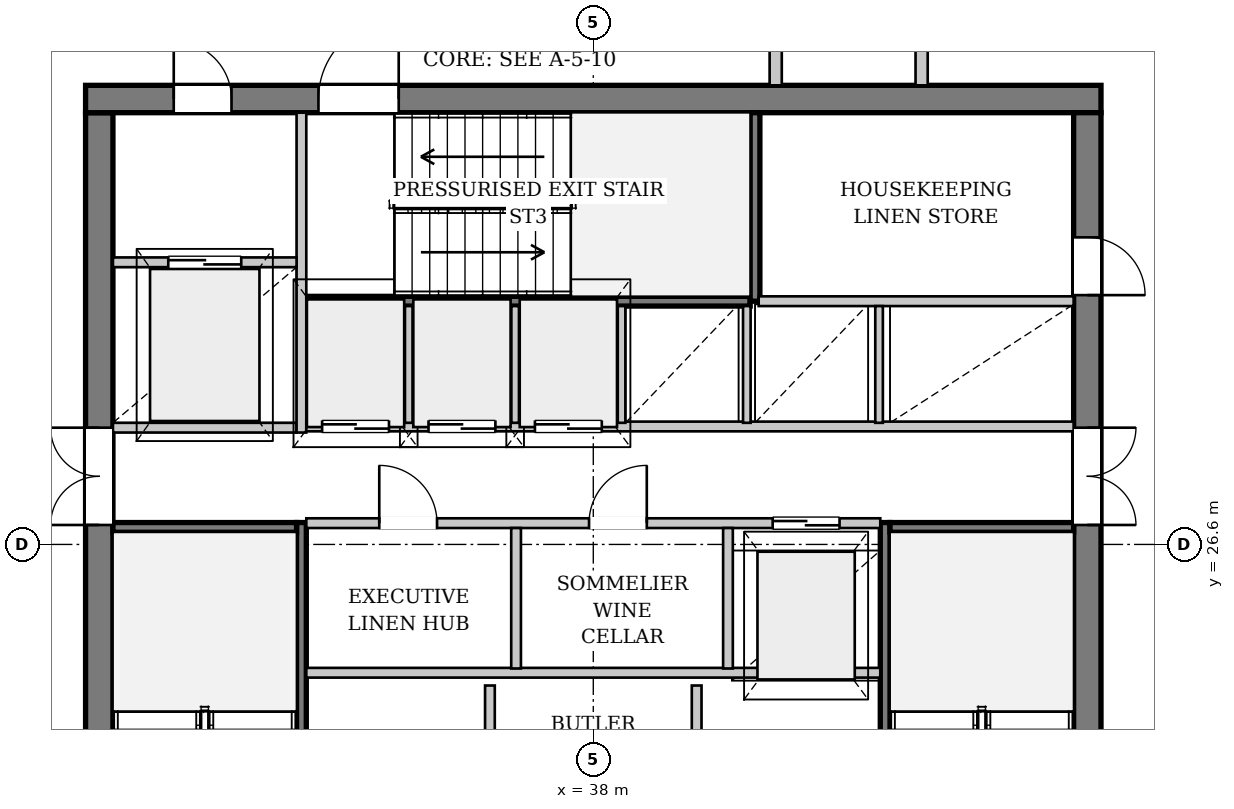
"""IFC4 building model, lengths in metres.
Left out: names, types, materials, properties, quantities, classifications, styles, units other than length and angle.
Written with IfcOpenShell. Run it as: python <this file> out.ifc"""

import sys

from ifc_helpers import new_model, si_unit, direction, frame, frame_2d, origin, place, context, subcontext, project, spatial, rectangle, extrude, source, transform, mapped, element, fill, save


model = new_model("IFC4")
c1 = context("Model", 3, precision=1e-05, world=origin(), true_north=direction((0.0, 1.0)))
c2 = subcontext(c1, "Body", "Model", "MODEL_VIEW")
j1 = project(units=[si_unit("LENGTHUNIT", "METRE"), si_unit("PLANEANGLEUNIT", "RADIAN")], contexts=[c1])
p1 = place(None, origin())
s1 = spatial("IfcSite", under=j1, at=p1, CompositionType="ELEMENT")
p2 = place(p1, origin())
s2 = spatial("IfcBuilding", under=s1, at=p2, CompositionType="ELEMENT")
p3 = place(p2, frame((0.0, 0.0, 256.1)))
s3 = spatial("IfcBuildingStorey", under=s2, at=p3, CompositionType="ELEMENT", Elevation=256.1)
p4 = place(p3, frame((51.86, 26.393, 0.0), z_axis=(0.0, 0.0, 1.0), x_axis=(-0.287077598684, -0.957907329721, 0.0)))
e1 = element("IfcWall", 1, at=p4, inside=s3, PredefinedType="SOLIDWALL", context=c2, shape_type="SweptSolid", body=[
    extrude(rectangle(XDim=22.458, YDim=0.32, at=frame_2d((11.229, 0.0))), origin(), (0.0, 0.0, 1.0), 2.872),
])
p5 = place(p4, frame((6.437, 0.0, 0.0)))
e2 = element("IfcOpeningElement", 2, at=p5, cuts=e1, PredefinedType="OPENING", context=c2, shape_type="SweptSolid", body=[
    extrude(rectangle(XDim=1.5, YDim=2.3, at=frame_2d((0.75, 1.15))), frame((0.0, 0.17, 0.0), z_axis=(0.0, -1.0, 0.0), x_axis=(1.0, 0.0, 0.0)), (0.0, 0.0, 1.0), 0.34),
])
p6 = place(p4, frame((15.319, 0.0, 0.402)))
e3 = element("IfcOpeningElement", 3, at=p6, cuts=e1, PredefinedType="OPENING", context=c2, shape_type="SweptSolid", body=[
    extrude(rectangle(XDim=2.6, YDim=2.35, at=frame_2d((1.3, 1.175))), frame((0.0, 0.17, 0.0), z_axis=(0.0, -1.0, 0.0), x_axis=(1.0, 0.0, 0.0)), (0.0, 0.0, 1.0), 0.34),
])
p7 = place(p3, frame((15.751, 27.495, 0.0), z_axis=(0.0, 0.0, 1.0), x_axis=(0.818194527571, 0.574941488373, 0.0)))
e4 = element("IfcWall", 4, at=p7, inside=s3, PredefinedType="SOLIDWALL", context=c2, shape_type="SweptSolid", body=[
    extrude(rectangle(XDim=21.931, YDim=0.38, at=frame_2d((10.965, 0.0))), origin(), (0.0, 0.0, 1.0), 2.872),
])
p8 = place(p7, frame((5.041, 0.0, 0.502)))
e5 = element("IfcOpeningElement", 5, at=p8, cuts=e4, PredefinedType="OPENING", context=c2, shape_type="SweptSolid", body=[
    extrude(rectangle(XDim=2.2, YDim=2.25, at=frame_2d((1.1, 1.125))), frame((0.0, 0.2, 0.0), z_axis=(0.0, -1.0, 0.0), x_axis=(1.0, 0.0, 0.0)), (0.0, 0.0, 1.0), 0.4),
])
p9 = place(p7, frame((15.79, 0.0, 0.502)))
e6 = element("IfcOpeningElement", 6, at=p9, cuts=e4, PredefinedType="OPENING", context=c2, shape_type="SweptSolid", body=[
    extrude(rectangle(XDim=2.2, YDim=2.25, at=frame_2d((1.1, 1.125))), frame((0.0, 0.2, 0.0), z_axis=(0.0, -1.0, 0.0), x_axis=(1.0, 0.0, 0.0)), (0.0, 0.0, 1.0), 0.4),
])
p10 = place(p3, frame((46.5, 5.302, 0.0), z_axis=(0.0, 0.0, 1.0), x_axis=(0.282616163499, 0.959233081232, 0.0)))
e7 = element("IfcWall", 7, at=p10, inside=s3, PredefinedType="PARAPET", context=c2, shape_type="SweptSolid", body=[
    extrude(rectangle(XDim=20.038, YDim=0.22, at=frame_2d((10.019, 0.0))), origin(), (0.0, 0.0, 1.0), 0.3),
])
p11 = place(p3, frame((29.875, 19.5, 0.0), z_axis=(0.0, 0.0, 1.0), x_axis=(0.0, 1.0, 0.0)))
e8 = element("IfcWall", 8, at=p11, inside=s3, PredefinedType="SHEAR", context=c2, shape_type="SweptSolid", body=[
    extrude(rectangle(XDim=14.2, YDim=0.45, at=frame_2d((7.1, 0.0))), origin(), (0.0, 0.0, 1.0), 3.38),
])
p12 = place(p11, frame((7.42, 0.0, 0.0)))
e9 = element("IfcOpeningElement", 9, at=p12, cuts=e8, PredefinedType="OPENING", context=c2, shape_type="SweptSolid", body=[
    extrude(rectangle(XDim=1.6, YDim=2.2, at=frame_2d((0.8, 1.1))), frame((0.0, 0.235, 0.0), z_axis=(0.0, -1.0, 0.0), x_axis=(1.0, 0.0, 0.0)), (0.0, 0.0, 1.0), 0.47),
])
p13 = place(p3, frame((29.65, 33.925, 0.0), z_axis=(0.0, 0.0, 1.0), x_axis=(1.0, 0.0, 0.0)))
e10 = element("IfcWall", 10, at=p13, inside=s3, PredefinedType="SHEAR", context=c2, shape_type="SweptSolid", body=[
    extrude(rectangle(XDim=16.7, YDim=0.45, at=frame_2d((8.35, 0.0))), origin(), (0.0, 0.0, 1.0), 3.38),
])
p14 = place(p13, frame((1.45, 0.0, 0.0)))
e11 = element("IfcOpeningElement", 11, at=p14, cuts=e10, PredefinedType="OPENING", context=c2, shape_type="SweptSolid", body=[
    extrude(rectangle(XDim=0.95, YDim=2.1, at=frame_2d((0.475, 1.05))), frame((0.0, 0.235, 0.0), z_axis=(0.0, -1.0, 0.0), x_axis=(1.0, 0.0, 0.0)), (0.0, 0.0, 1.0), 0.47),
])
p15 = place(p13, frame((3.83, 0.0, 0.0)))
e12 = element("IfcOpeningElement", 12, at=p15, cuts=e10, PredefinedType="OPENING", context=c2, shape_type="SweptSolid", body=[
    extrude(rectangle(XDim=1.32, YDim=2.2, at=frame_2d((0.66, 1.1))), frame((0.0, 0.235, 0.0), z_axis=(0.0, -1.0, 0.0), x_axis=(1.0, 0.0, 0.0)), (0.0, 0.0, 1.0), 0.47),
])
p16 = place(p3, frame((46.125, 33.7, 0.0), z_axis=(0.0, 0.0, 1.0), x_axis=(0.0, -1.0, 0.0)))
e13 = element("IfcWall", 13, at=p16, inside=s3, PredefinedType="SHEAR", context=c2, shape_type="SweptSolid", body=[
    extrude(rectangle(XDim=14.2, YDim=0.45, at=frame_2d((7.1, 0.0))), origin(), (0.0, 0.0, 1.0), 3.38),
])
p17 = place(p16, frame((5.18, 0.0, 0.0)))
e14 = element("IfcOpeningElement", 14, at=p17, cuts=e13, PredefinedType="OPENING", context=c2, shape_type="SweptSolid", body=[
    extrude(rectangle(XDim=1.6, YDim=2.2, at=frame_2d((0.8, 1.1))), frame((0.0, 0.235, 0.0), z_axis=(0.0, -1.0, 0.0), x_axis=(1.0, 0.0, 0.0)), (0.0, 0.0, 1.0), 0.47),
])
p18 = place(p16, frame((2.05, 0.0, 0.0)))
e15 = element("IfcOpeningElement", 15, at=p18, cuts=e13, PredefinedType="OPENING", context=c2, shape_type="SweptSolid", body=[
    extrude(rectangle(XDim=0.95, YDim=2.1, at=frame_2d((0.475, 1.05))), frame((0.0, 0.235, 0.0), z_axis=(0.0, -1.0, 0.0), x_axis=(1.0, 0.0, 0.0)), (0.0, 0.0, 1.0), 0.47),
])
p19 = place(p3, frame((33.2, 19.5, 0.0), z_axis=(0.0, 0.0, 1.0), x_axis=(0.0, 1.0, 0.0)))
e16 = element("IfcWall", 16, at=p19, inside=s3, PredefinedType="PARTITIONING", context=c2, shape_type="SweptSolid", body=[
    extrude(rectangle(XDim=7.46, YDim=0.16, at=frame_2d((3.73, 0.0))), origin(), (0.0, 0.0, 1.0), 3.38),
])
p20 = place(p19, frame((0.08, 0.0, 0.0)))
e17 = element("IfcOpeningElement", 17, at=p20, cuts=e16, PredefinedType="OPENING", context=c2, shape_type="SweptSolid", body=[
    extrude(rectangle(XDim=1.32, YDim=2.2, at=frame_2d((0.66, 1.1))), frame((0.0, 0.09, 0.0), z_axis=(0.0, -1.0, 0.0), x_axis=(1.0, 0.0, 0.0)), (0.0, 0.0, 1.0), 0.18),
])
p21 = place(p3, frame((30.1, 26.88, 0.0), z_axis=(0.0, 0.0, 1.0), x_axis=(1.0, 0.0, 0.0)))
e18 = element("IfcWall", 18, at=p21, inside=s3, PredefinedType="PARTITIONING", context=c2, shape_type="SweptSolid", body=[
    extrude(rectangle(XDim=3.02, YDim=0.16, at=frame_2d((1.51, 0.0))), origin(), (0.0, 0.0, 1.0), 3.38),
])
p22 = place(p3, frame((42.8, 26.96, 0.0), z_axis=(0.0, 0.0, 1.0), x_axis=(0.0, -1.0, 0.0)))
e19 = element("IfcWall", 19, at=p22, inside=s3, PredefinedType="PARTITIONING", context=c2, shape_type="SweptSolid", body=[
    extrude(rectangle(XDim=7.46, YDim=0.16, at=frame_2d((3.73, 0.0))), origin(), (0.0, 0.0, 1.0), 3.38),
])
p23 = place(p22, frame((6.06, 0.0, 0.0)))
e20 = element("IfcOpeningElement", 20, at=p23, cuts=e19, PredefinedType="OPENING", context=c2, shape_type="SweptSolid", body=[
    extrude(rectangle(XDim=1.32, YDim=2.2, at=frame_2d((0.66, 1.1))), frame((0.0, 0.09, 0.0), z_axis=(0.0, -1.0, 0.0), x_axis=(1.0, 0.0, 0.0)), (0.0, 0.0, 1.0), 0.18),
])
p24 = place(p3, frame((42.88, 26.88, 0.0), z_axis=(0.0, 0.0, 1.0), x_axis=(1.0, 0.0, 0.0)))
e21 = element("IfcWall", 21, at=p24, inside=s3, PredefinedType="PARTITIONING", context=c2, shape_type="SweptSolid", body=[
    extrude(rectangle(XDim=3.02, YDim=0.16, at=frame_2d((1.51, 0.0))), origin(), (0.0, 0.0, 1.0), 3.38),
])
p25 = place(p3, frame((33.28, 30.6, 0.0), z_axis=(0.0, 0.0, 1.0), x_axis=(1.0, 0.0, 0.0)))
e22 = element("IfcWall", 22, at=p25, inside=s3, PredefinedType="PARTITIONING", context=c2, shape_type="SweptSolid", body=[
    extrude(rectangle(XDim=7.3, YDim=0.16, at=frame_2d((3.65, 0.0))), origin(), (0.0, 0.0, 1.0), 3.38),
])
p26 = place(p3, frame((40.66, 30.6, 0.0), z_axis=(0.0, 0.0, 1.0), x_axis=(0.0, 1.0, 0.0)))
e23 = element("IfcWall", 23, at=p26, inside=s3, PredefinedType="PARTITIONING", context=c2, shape_type="SweptSolid", body=[
    extrude(rectangle(XDim=3.1, YDim=0.16, at=frame_2d((1.55, 0.0))), origin(), (0.0, 0.0, 1.0), 3.38),
])
p27 = place(p3, frame((36.3, 19.5, 0.0), z_axis=(0.0, 0.0, 1.0), x_axis=(0.0, 1.0, 0.0)))
e24 = element("IfcWall", 24, at=p27, inside=s3, PredefinedType="PARTITIONING", context=c2, shape_type="SweptSolid", body=[
    extrude(rectangle(XDim=4.78, YDim=0.16, at=frame_2d((2.39, 0.0))), origin(), (0.0, 0.0, 1.0), 3.38),
])
p28 = place(p27, frame((0.6, 0.0, 0.0)))
e25 = element("IfcOpeningElement", 25, at=p28, cuts=e24, PredefinedType="OPENING", context=c2, shape_type="SweptSolid", body=[
    extrude(rectangle(XDim=1.2, YDim=2.2, at=frame_2d((0.6, 1.1))), frame((0.0, 0.09, 0.0), z_axis=(0.0, -1.0, 0.0), x_axis=(1.0, 0.0, 0.0)), (0.0, 0.0, 1.0), 0.18),
])
p29 = place(p27, frame((2.65, 0.0, 0.0)))
e26 = element("IfcOpeningElement", 26, at=p29, cuts=e24, PredefinedType="OPENING", context=c2, shape_type="SweptSolid", body=[
    extrude(rectangle(XDim=0.95, YDim=2.1, at=frame_2d((0.475, 1.05))), frame((0.0, 0.09, 0.0), z_axis=(0.0, -1.0, 0.0), x_axis=(1.0, 0.0, 0.0)), (0.0, 0.0, 1.0), 0.18),
])
p30 = place(p3, frame((39.7, 24.28, 0.0), z_axis=(0.0, 0.0, 1.0), x_axis=(0.0, -1.0, 0.0)))
e27 = element("IfcWall", 27, at=p30, inside=s3, PredefinedType="PARTITIONING", context=c2, shape_type="SweptSolid", body=[
    extrude(rectangle(XDim=4.78, YDim=0.16, at=frame_2d((2.39, 0.0))), origin(), (0.0, 0.0, 1.0), 3.38),
])
p31 = place(p30, frame((3.12, 0.0, 0.0)))
e28 = element("IfcOpeningElement", 28, at=p31, cuts=e27, PredefinedType="OPENING", context=c2, shape_type="SweptSolid", body=[
    extrude(rectangle(XDim=1.2, YDim=2.2, at=frame_2d((0.6, 1.1))), frame((0.0, 0.09, 0.0), z_axis=(0.0, -1.0, 0.0), x_axis=(1.0, 0.0, 0.0)), (0.0, 0.0, 1.0), 0.18),
])
p32 = place(p3, frame((33.28, 24.49, 0.0), z_axis=(0.0, 0.0, 1.0), x_axis=(1.0, 0.0, 0.0)))
e29 = element("IfcWall", 29, at=p32, inside=s3, PredefinedType="PARTITIONING", context=c2, shape_type="SweptSolid", body=[
    extrude(rectangle(XDim=9.44, YDim=0.16, at=frame_2d((4.72, 0.0))), origin(), (0.0, 0.0, 1.0), 3.38),
])
p33 = place(p3, frame((30.1, 28.52, 0.0), z_axis=(0.0, 0.0, 1.0), x_axis=(1.0, 0.0, 0.0)))
e30 = element("IfcWall", 30, at=p33, inside=s3, PredefinedType="PARTITIONING", context=c2, shape_type="SweptSolid", body=[
    extrude(rectangle(XDim=3.02, YDim=0.16, at=frame_2d((1.51, 0.0))), origin(), (0.0, 0.0, 1.0), 3.38),
])
p34 = place(p3, frame((33.2, 28.44, 0.0), z_axis=(0.0, 0.0, 1.0), x_axis=(0.0, 1.0, 0.0)))
e31 = element("IfcWall", 31, at=p34, inside=s3, PredefinedType="PARTITIONING", context=c2, shape_type="SweptSolid", body=[
    extrude(rectangle(XDim=5.26, YDim=0.16, at=frame_2d((2.63, 0.0))), origin(), (0.0, 0.0, 1.0), 3.38),
])
p35 = place(p3, frame((30.1, 31.24, 0.0), z_axis=(0.0, 0.0, 1.0), x_axis=(1.0, 0.0, 0.0)))
e32 = element("IfcWall", 32, at=p35, inside=s3, PredefinedType="PARTITIONING", context=c2, shape_type="SweptSolid", body=[
    extrude(rectangle(XDim=3.02, YDim=0.16, at=frame_2d((1.51, 0.0))), origin(), (0.0, 0.0, 1.0), 3.38),
])
p36 = place(p35, frame((0.91, 0.0, 0.0)))
e33 = element("IfcOpeningElement", 33, at=p36, cuts=e32, PredefinedType="OPENING", context=c2, shape_type="SweptSolid", body=[
    extrude(rectangle(XDim=1.2, YDim=2.2, at=frame_2d((0.6, 1.1))), frame((0.0, 0.09, 0.0), z_axis=(0.0, -1.0, 0.0), x_axis=(1.0, 0.0, 0.0)), (0.0, 0.0, 1.0), 0.18),
])
p37 = place(p3, frame((33.28, 26.95, 0.0), z_axis=(0.0, 0.0, 1.0), x_axis=(1.0, 0.0, 0.0)))
e34 = element("IfcWall", 34, at=p37, inside=s3, PredefinedType="PARTITIONING", context=c2, shape_type="SweptSolid", body=[
    extrude(rectangle(XDim=9.44, YDim=0.16, at=frame_2d((4.72, 0.0))), origin(), (0.0, 0.0, 1.0), 3.38),
])
p38 = place(p37, frame((1.2, 0.0, 0.0)))
e35 = element("IfcOpeningElement", 35, at=p38, cuts=e34, PredefinedType="OPENING", context=c2, shape_type="SweptSolid", body=[
    extrude(rectangle(XDim=0.95, YDim=2.1, at=frame_2d((0.475, 1.05))), frame((0.0, 0.09, 0.0), z_axis=(0.0, -1.0, 0.0), x_axis=(1.0, 0.0, 0.0)), (0.0, 0.0, 1.0), 0.18),
])
p39 = place(p37, frame((4.65, 0.0, 0.0)))
e36 = element("IfcOpeningElement", 36, at=p39, cuts=e34, PredefinedType="OPENING", context=c2, shape_type="SweptSolid", body=[
    extrude(rectangle(XDim=0.95, YDim=2.1, at=frame_2d((0.475, 1.05))), frame((0.0, 0.09, 0.0), z_axis=(0.0, -1.0, 0.0), x_axis=(1.0, 0.0, 0.0)), (0.0, 0.0, 1.0), 0.18),
])
p40 = place(p37, frame((7.67, 0.0, 0.0)))
e37 = element("IfcOpeningElement", 37, at=p40, cuts=e34, PredefinedType="OPENING", context=c2, shape_type="SweptSolid", body=[
    extrude(rectangle(XDim=1.1, YDim=2.2, at=frame_2d((0.55, 1.1))), frame((0.0, 0.09, 0.0), z_axis=(0.0, -1.0, 0.0), x_axis=(1.0, 0.0, 0.0)), (0.0, 0.0, 1.0), 0.18),
])
for number, where, z_axis, x_axis in (
    (38, (36.73, 24.56, 0.0), (0.0, 0.0, 1.0), (0.0, 1.0, 0.0)),
    (39, (40.215, 24.56, 0.0), (0.0, 0.0, 1.0), (0.0, 1.0, 0.0)),
):
    element("IfcWall", number, at=place(p3, frame(where, z_axis=z_axis, x_axis=x_axis)), inside=s3, PredefinedType="PARTITIONING", context=c2, shape_type="SweptSolid", body=[
        extrude(rectangle(XDim=2.31, YDim=0.16, at=frame_2d((1.155, 0.0))), origin(), (0.0, 0.0, 1.0), 3.38),
    ])
p41 = place(p3, frame((33.28, 28.54, 0.0), z_axis=(0.0, 0.0, 1.0), x_axis=(1.0, 0.0, 0.0)))
e40 = element("IfcWall", 40, at=p41, inside=s3, PredefinedType="PARTITIONING", context=c2, shape_type="SweptSolid", body=[
    extrude(rectangle(XDim=12.62, YDim=0.16, at=frame_2d((6.31, 0.0))), origin(), (0.0, 0.0, 1.0), 3.38),
])
p42 = place(p41, frame((0.26, 0.0, 0.0)))
e41 = element("IfcOpeningElement", 41, at=p42, cuts=e40, PredefinedType="OPENING", context=c2, shape_type="SweptSolid", body=[
    extrude(rectangle(XDim=1.1, YDim=2.2, at=frame_2d((0.55, 1.1))), frame((0.0, 0.09, 0.0), z_axis=(0.0, -1.0, 0.0), x_axis=(1.0, 0.0, 0.0)), (0.0, 0.0, 1.0), 0.18),
])
p43 = place(p41, frame((2.01, 0.0, 0.0)))
e42 = element("IfcOpeningElement", 42, at=p43, cuts=e40, PredefinedType="OPENING", context=c2, shape_type="SweptSolid", body=[
    extrude(rectangle(XDim=1.1, YDim=2.2, at=frame_2d((0.55, 1.1))), frame((0.0, 0.09, 0.0), z_axis=(0.0, -1.0, 0.0), x_axis=(1.0, 0.0, 0.0)), (0.0, 0.0, 1.0), 0.18),
])
p44 = place(p41, frame((3.76, 0.0, 0.0)))
e43 = element("IfcOpeningElement", 43, at=p44, cuts=e40, PredefinedType="OPENING", context=c2, shape_type="SweptSolid", body=[
    extrude(rectangle(XDim=1.1, YDim=2.2, at=frame_2d((0.55, 1.1))), frame((0.0, 0.09, 0.0), z_axis=(0.0, -1.0, 0.0), x_axis=(1.0, 0.0, 0.0)), (0.0, 0.0, 1.0), 0.18),
])
p45 = place(p3, frame((40.72, 30.6, 0.0), z_axis=(0.0, 0.0, 1.0), x_axis=(1.0, 0.0, 0.0)))
e44 = element("IfcWall", 44, at=p45, inside=s3, PredefinedType="PARTITIONING", context=c2, shape_type="SweptSolid", body=[
    extrude(rectangle(XDim=5.18, YDim=0.16, at=frame_2d((2.59, 0.0))), origin(), (0.0, 0.0, 1.0), 3.38),
])
for number, where, z_axis, x_axis in (
    (45, (34.965, 28.6, 0.0), (0.0, 0.0, 1.0), (0.0, 1.0, 0.0)),
    (46, (36.715, 28.6, 0.0), (0.0, 0.0, 1.0), (0.0, 1.0, 0.0)),
    (47, (38.465, 28.6, 0.0), (0.0, 0.0, 1.0), (0.0, 1.0, 0.0)),
    (48, (40.525, 28.6, 0.0), (0.0, 0.0, 1.0), (0.0, 1.0, 0.0)),
    (49, (42.7, 28.6, 0.0), (0.0, 0.0, 1.0), (0.0, 1.0, 0.0)),
):
    element("IfcWall", number, at=place(p3, frame(where, z_axis=z_axis, x_axis=x_axis)), inside=s3, PredefinedType="PARTITIONING", context=c2, shape_type="SweptSolid", body=[
        extrude(rectangle(XDim=1.92, YDim=0.125, at=frame_2d((0.96, 0.0))), origin(), (0.0, 0.0, 1.0), 3.38),
    ])
p46 = place(p3, frame((41.0, 34.15, 0.0), z_axis=(0.0, 0.0, 1.0), x_axis=(0.0, 1.0, 0.0)))
e50 = element("IfcWall", 50, at=p46, inside=s3, PredefinedType="PARTITIONING", context=c2, shape_type="SweptSolid", body=[
    extrude(rectangle(XDim=1.85, YDim=0.2, at=frame_2d((0.925, 0.0))), origin(), (0.0, 0.0, 1.0), 3.38),
])
p47 = place(p3, frame((43.4, 34.15, 0.0), z_axis=(0.0, 0.0, 1.0), x_axis=(0.0, 1.0, 0.0)))
e51 = element("IfcWall", 51, at=p47, inside=s3, PredefinedType="PARTITIONING", context=c2, shape_type="SweptSolid", body=[
    extrude(rectangle(XDim=1.85, YDim=0.2, at=frame_2d((0.925, 0.0))), origin(), (0.0, 0.0, 1.0), 3.055),
])
m1 = source(origin(), c2, "Body", "SweptSolid", [
    extrude(rectangle(XDim=1.6, YDim=2.2, at=frame_2d((0.8, 1.1))), frame((0.0, 0.025, 0.0), z_axis=(0.0, -1.0, 0.0), x_axis=(1.0, 0.0, 0.0)), (0.0, 0.0, 1.0), 0.05),
])
p48 = place(p12, origin())
e52 = element("IfcDoor", 52, at=p48, inside=s3, OperationType="DOUBLE_DOOR_SINGLE_SWING", PredefinedType="DOOR", context=c2, shape_type="MappedRepresentation", body=[
    mapped(m1, transform((0.0, 0.0, 0.0), x_axis=(1.0, 0.0, 0.0), y_axis=(0.0, 1.0, 0.0), z_axis=(0.0, 0.0, 1.0), scale=1.0)),
])
fill(e9, e52)
m2 = source(origin(), c2, "Body", "SweptSolid", [
    extrude(rectangle(XDim=0.95, YDim=2.1, at=frame_2d((0.475, 1.05))), frame((0.0, 0.025, 0.0), z_axis=(0.0, -1.0, 0.0), x_axis=(1.0, 0.0, 0.0)), (0.0, 0.0, 1.0), 0.05),
])
p49 = place(p14, origin())
e53 = element("IfcDoor", 53, at=p49, inside=s3, OperationType="SINGLE_SWING_LEFT", PredefinedType="DOOR", context=c2, shape_type="MappedRepresentation", body=[
    mapped(m2, transform((0.0, 0.0, 0.0), x_axis=(1.0, 0.0, 0.0), y_axis=(0.0, 1.0, 0.0), z_axis=(0.0, 0.0, 1.0), scale=1.0)),
])
fill(e11, e53)
m3 = source(origin(), c2, "Body", "SweptSolid", [
    extrude(rectangle(XDim=1.32, YDim=2.2, at=frame_2d((0.66, 1.1))), frame((0.0, 0.025, 0.0), z_axis=(0.0, -1.0, 0.0), x_axis=(1.0, 0.0, 0.0)), (0.0, 0.0, 1.0), 0.05),
])
p50 = place(p15, origin())
e54 = element("IfcDoor", 54, at=p50, inside=s3, OperationType="SINGLE_SWING_RIGHT", PredefinedType="DOOR", context=c2, shape_type="MappedRepresentation", body=[
    mapped(m3, transform((0.0, 0.0, 0.0), x_axis=(1.0, 0.0, 0.0), y_axis=(0.0, 1.0, 0.0), z_axis=(0.0, 0.0, 1.0), scale=1.0)),
])
fill(e12, e54)
p51 = place(p17, origin())
e55 = element("IfcDoor", 55, at=p51, inside=s3, OperationType="DOUBLE_DOOR_SINGLE_SWING", PredefinedType="DOOR", context=c2, shape_type="MappedRepresentation", body=[
    mapped(m1, transform((0.0, 0.0, 0.0), x_axis=(1.0, 0.0, 0.0), y_axis=(0.0, 1.0, 0.0), z_axis=(0.0, 0.0, 1.0), scale=1.0)),
])
fill(e14, e55)
m4 = source(origin(), c2, "Body", "SweptSolid", [
    extrude(rectangle(XDim=1.2, YDim=2.2, at=frame_2d((0.6, 1.1))), frame((0.0, 0.025, 0.0), z_axis=(0.0, -1.0, 0.0), x_axis=(1.0, 0.0, 0.0)), (0.0, 0.0, 1.0), 0.05),
])
p52 = place(p36, origin())
e56 = element("IfcDoor", 56, at=p52, inside=s3, OperationType="DOUBLE_DOOR_SLIDING", PredefinedType="DOOR", context=c2, shape_type="MappedRepresentation", body=[
    mapped(m4, transform((0.0, 0.0, 0.0), x_axis=(1.0, 0.0, 0.0), y_axis=(0.0, 1.0, 0.0), z_axis=(0.0, 0.0, 1.0), scale=1.0)),
])
fill(e33, e56)
p53 = place(p38, origin())
e57 = element("IfcDoor", 57, at=p53, inside=s3, OperationType="SINGLE_SWING_LEFT", PredefinedType="DOOR", context=c2, shape_type="MappedRepresentation", body=[
    mapped(m2, transform((0.0, 0.0, 0.0), x_axis=(1.0, 0.0, 0.0), y_axis=(0.0, 1.0, 0.0), z_axis=(0.0, 0.0, 1.0), scale=1.0)),
])
fill(e35, e57)
p54 = place(p39, origin())
e58 = element("IfcDoor", 58, at=p54, inside=s3, OperationType="SINGLE_SWING_RIGHT", PredefinedType="DOOR", context=c2, shape_type="MappedRepresentation", body=[
    mapped(m2, transform((0.0, 0.0, 0.0), x_axis=(1.0, 0.0, 0.0), y_axis=(0.0, 1.0, 0.0), z_axis=(0.0, 0.0, 1.0), scale=1.0)),
])
fill(e36, e58)
m5 = source(origin(), c2, "Body", "SweptSolid", [
    extrude(rectangle(XDim=1.1, YDim=2.2, at=frame_2d((0.55, 1.1))), frame((0.0, 0.025, 0.0), z_axis=(0.0, -1.0, 0.0), x_axis=(1.0, 0.0, 0.0)), (0.0, 0.0, 1.0), 0.05),
])
p55 = place(p40, origin())
e59 = element("IfcDoor", 59, at=p55, inside=s3, OperationType="DOUBLE_DOOR_SLIDING", PredefinedType="DOOR", context=c2, shape_type="MappedRepresentation", body=[
    mapped(m5, transform((0.0, 0.0, 0.0), x_axis=(1.0, 0.0, 0.0), y_axis=(0.0, 1.0, 0.0), z_axis=(0.0, 0.0, 1.0), scale=1.0)),
])
fill(e37, e59)
p56 = place(p42, origin())
e60 = element("IfcDoor", 60, at=p56, inside=s3, OperationType="DOUBLE_DOOR_SLIDING", PredefinedType="DOOR", context=c2, shape_type="MappedRepresentation", body=[
    mapped(m5, transform((0.0, 0.0, 0.0), x_axis=(1.0, 0.0, 0.0), y_axis=(0.0, 1.0, 0.0), z_axis=(0.0, 0.0, 1.0), scale=1.0)),
])
fill(e41, e60)
p57 = place(p43, origin())
e61 = element("IfcDoor", 61, at=p57, inside=s3, OperationType="DOUBLE_DOOR_SLIDING", PredefinedType="DOOR", context=c2, shape_type="MappedRepresentation", body=[
    mapped(m5, transform((0.0, 0.0, 0.0), x_axis=(1.0, 0.0, 0.0), y_axis=(0.0, 1.0, 0.0), z_axis=(0.0, 0.0, 1.0), scale=1.0)),
])
fill(e42, e61)
p58 = place(p44, origin())
e62 = element("IfcDoor", 62, at=p58, inside=s3, OperationType="DOUBLE_DOOR_SLIDING", PredefinedType="DOOR", context=c2, shape_type="MappedRepresentation", body=[
    mapped(m5, transform((0.0, 0.0, 0.0), x_axis=(1.0, 0.0, 0.0), y_axis=(0.0, 1.0, 0.0), z_axis=(0.0, 0.0, 1.0), scale=1.0)),
])
fill(e43, e62)
p59 = place(p18, origin())
e63 = element("IfcDoor", 63, at=p59, inside=s3, OperationType="SINGLE_SWING_RIGHT", PredefinedType="DOOR", context=c2, shape_type="MappedRepresentation", body=[
    mapped(m2, transform((0.0, 0.0, 0.0), x_axis=(1.0, 0.0, 0.0), y_axis=(0.0, 1.0, 0.0), z_axis=(0.0, 0.0, 1.0), scale=1.0)),
])
fill(e15, e63)
save(model, sys.argv[1])
